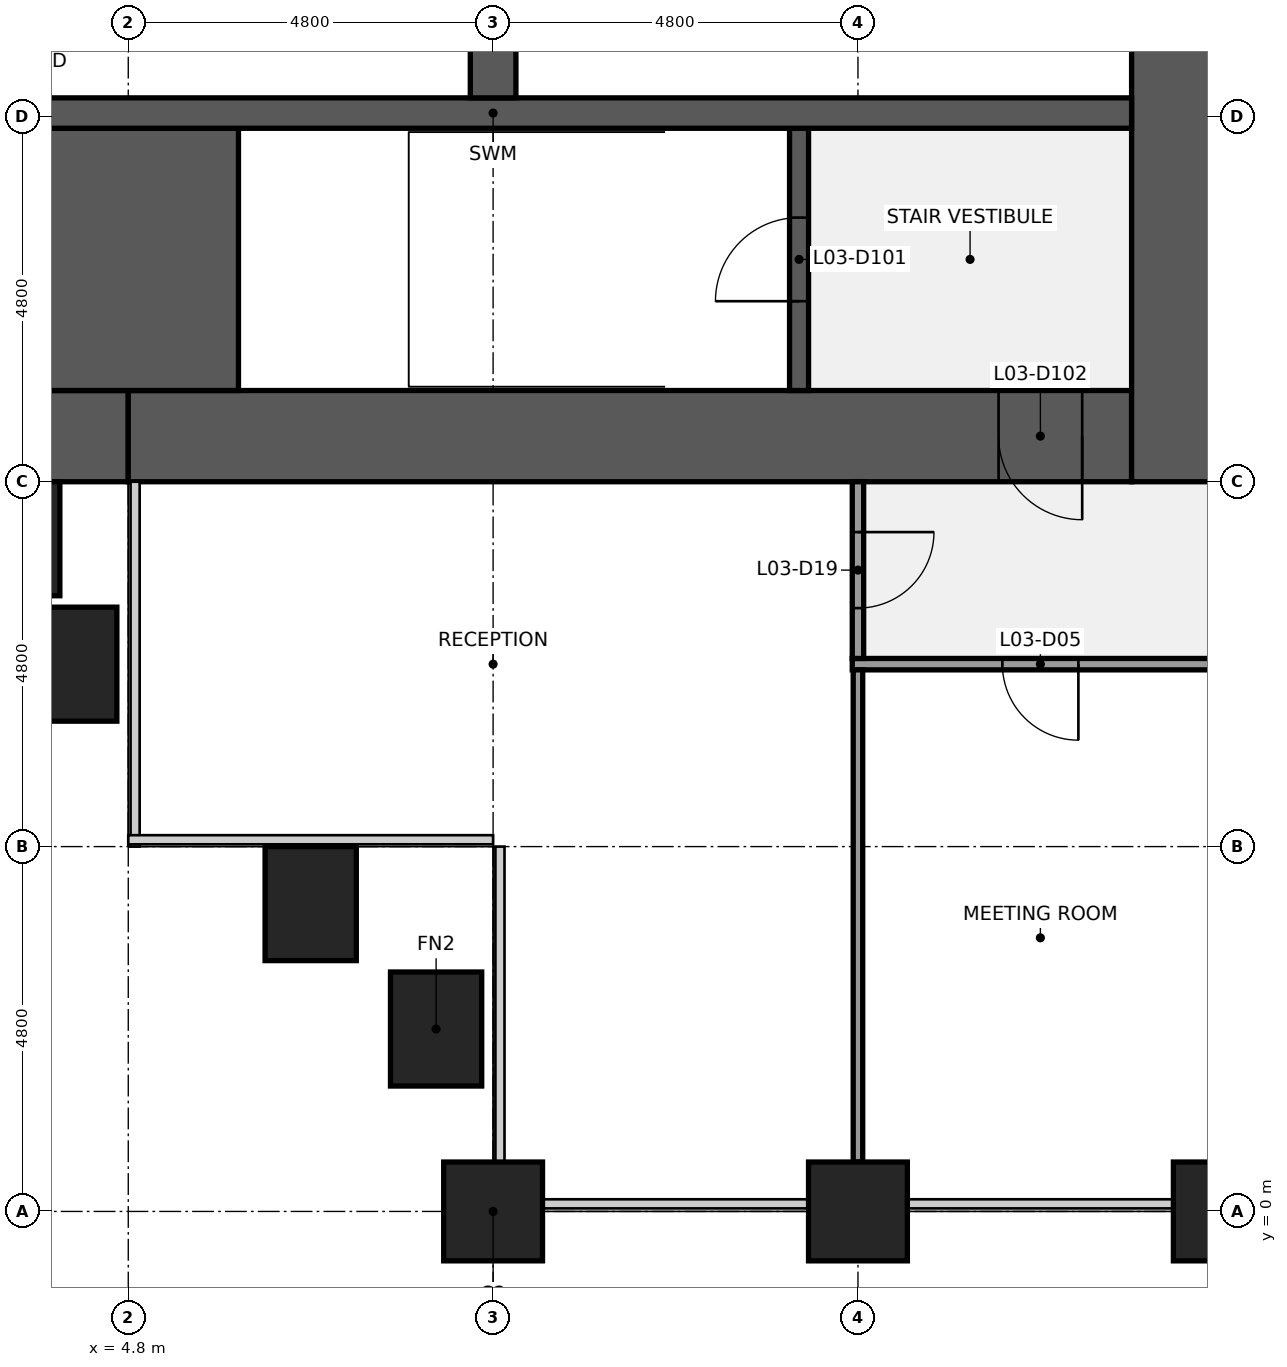
"""IFC4 building model, lengths in metres.
Left out: names, types, materials, properties, quantities, classifications, styles, units other than length and angle.
Written with IfcOpenShell. Run it as: python <this file> out.ifc"""

import sys

from ifc_helpers import new_model, si_unit, direction, frame, frame_2d, origin, origin_2d, place, context, subcontext, project, spatial, rectangle, extrude, element, fill, save


model = new_model("IFC4")
c1 = context("Model", 3, precision=1e-05, world=origin(), true_north=direction((0.0, 1.0)))
c2 = subcontext(c1, "Body", "Model", "MODEL_VIEW")
j1 = project(units=[si_unit("LENGTHUNIT", "METRE"), si_unit("PLANEANGLEUNIT", "RADIAN")], contexts=[c1])
p1 = place(None, origin())
s1 = spatial("IfcSite", under=j1, at=p1, CompositionType="ELEMENT")
p2 = place(p1, origin())
s2 = spatial("IfcBuilding", under=s1, at=p2, CompositionType="ELEMENT")
p3 = place(p2, frame((0.0, 0.0, 21.4)))
s3 = spatial("IfcBuildingStorey", under=s2, at=p3, CompositionType="ELEMENT", Elevation=21.4)
for number, where, z_axis, x_axis in (
    (1, (9.6, 0.0, 0.0), (0.0, 0.0, 1.0), (1.0, 0.0, 0.0)),
    (2, (14.4, 0.0, 0.0), (0.0, 0.0, 1.0), (1.0, 0.0, 0.0)),
    (3, (19.2, 0.0, 0.0), (0.0, 0.0, 1.0), (1.0, 0.0, 0.0)),
):
    element("IfcColumn", number, at=place(p3, frame(where, z_axis=z_axis, x_axis=x_axis)), inside=s3, PredefinedType="COLUMN", context=c2, shape_type="SweptSolid", body=[
        extrude(rectangle(XDim=1.3, YDim=1.3, at=origin_2d()), origin(), (0.0, 0.0, 1.0), 4.4),
    ])
p4 = place(p3, frame((4.8, 10.2, 0.0), z_axis=(0.0, 0.0, 1.0), x_axis=(-1.0, 0.0, 0.0)))
e4 = element("IfcWall", 4, at=p4, inside=s3, PredefinedType="SHEAR", context=c2, shape_type="SweptSolid", body=[
    extrude(rectangle(XDim=3.6, YDim=1.2, at=frame_2d((1.8, 0.0))), origin(), (0.0, 0.0, 1.0), 4.24),
])
p5 = place(p3, frame((18.0, 10.2, 0.0), z_axis=(0.0, 0.0, 1.0), x_axis=(-1.0, 0.0, 0.0)))
e5 = element("IfcWall", 5, at=p5, inside=s3, PredefinedType="SHEAR", context=c2, shape_type="SweptSolid", body=[
    extrude(rectangle(XDim=13.2, YDim=1.2, at=frame_2d((6.6, 0.0))), origin(), (0.0, 0.0, 1.0), 4.24),
])
p6 = place(p5, frame((0.65, 0.0, 0.0)))
e6 = element("IfcOpeningElement", 6, at=p6, cuts=e5, PredefinedType="OPENING", context=c2, shape_type="SweptSolid", body=[
    extrude(rectangle(XDim=1.1, YDim=2.1, at=frame_2d((0.55, 1.05))), frame((0.0, 0.61, 0.0), z_axis=(0.0, -1.0, 0.0), x_axis=(1.0, 0.0, 0.0)), (0.0, 0.0, 1.0), 1.22),
])
p7 = place(p3, frame((18.6, 38.4, 0.0), z_axis=(0.0, 0.0, 1.0), x_axis=(0.0, -1.0, 0.0)))
e7 = element("IfcWall", 7, at=p7, inside=s3, PredefinedType="SHEAR", context=c2, shape_type="SweptSolid", body=[
    extrude(rectangle(XDim=28.8, YDim=1.2, at=frame_2d((14.4, 0.0))), origin(), (0.0, 0.0, 1.0), 4.24),
])
p8 = place(p7, frame((18.3, 0.0, 0.0)))
e8 = element("IfcOpeningElement", 8, at=p8, cuts=e7, PredefinedType="OPENING", context=c2, shape_type="SweptSolid", body=[
    extrude(rectangle(XDim=1.8, YDim=2.1, at=frame_2d((0.9, 1.05))), frame((0.0, 0.61, 0.0), z_axis=(0.0, -1.0, 0.0), x_axis=(1.0, 0.0, 0.0)), (0.0, 0.0, 1.0), 1.22),
])
p9 = place(p7, frame((8.7, 0.0, 0.0)))
e9 = element("IfcOpeningElement", 9, at=p9, cuts=e7, PredefinedType="OPENING", context=c2, shape_type="SweptSolid", body=[
    extrude(rectangle(XDim=1.8, YDim=2.1, at=frame_2d((0.9, 1.05))), frame((0.0, 0.61, 0.0), z_axis=(0.0, -1.0, 0.0), x_axis=(1.0, 0.0, 0.0)), (0.0, 0.0, 1.0), 1.22),
])
p10 = place(p3, frame((1.2, 12.525, 0.0), z_axis=(0.0, 0.0, 1.0), x_axis=(1.0, 0.0, 0.0)))
e10 = element("IfcWall", 10, at=p10, inside=s3, PredefinedType="SHEAR", context=c2, shape_type="SweptSolid", body=[
    extrude(rectangle(XDim=5.05, YDim=3.45, at=frame_2d((2.525, 0.0))), origin(), (0.0, 0.0, 1.0), 4.24),
])
p11 = place(p3, frame((13.625, 10.8, 0.0), z_axis=(0.0, 0.0, 1.0), x_axis=(0.0, 1.0, 0.0)))
e11 = element("IfcWall", 11, at=p11, inside=s3, PredefinedType="SHEAR", context=c2, shape_type="SweptSolid", body=[
    extrude(rectangle(XDim=3.45, YDim=0.25, at=frame_2d((1.725, 0.0))), origin(), (0.0, 0.0, 1.0), 4.24),
])
p12 = place(p11, frame((1.175, 0.0, 0.0)))
e12 = element("IfcOpeningElement", 12, at=p12, cuts=e11, PredefinedType="OPENING", context=c2, shape_type="SweptSolid", body=[
    extrude(rectangle(XDim=1.1, YDim=2.1, at=frame_2d((0.55, 1.05))), frame((0.0, 0.135, 0.0), z_axis=(0.0, -1.0, 0.0), x_axis=(1.0, 0.0, 0.0)), (0.0, 0.0, 1.0), 0.27),
])
p13 = place(p3, frame((1.2, 14.45, 0.0), z_axis=(0.0, 0.0, 1.0), x_axis=(1.0, 0.0, 0.0)))
e13 = element("IfcWall", 13, at=p13, inside=s3, PredefinedType="SHEAR", context=c2, shape_type="SweptSolid", body=[
    extrude(rectangle(XDim=16.8, YDim=0.4, at=frame_2d((8.4, 0.0))), origin(), (0.0, 0.0, 1.0), 4.24),
])
p14 = place(p3, frame((9.6, 14.65, 0.0), z_axis=(0.0, 0.0, 1.0), x_axis=(0.0, 1.0, 0.0)))
e14 = element("IfcWall", 14, at=p14, inside=s3, PredefinedType="SHEAR", context=c2, shape_type="SweptSolid", body=[
    extrude(rectangle(XDim=2.6, YDim=0.6, at=frame_2d((1.3, 0.0))), origin(), (0.0, 0.0, 1.0), 4.24),
])
p15 = place(p3, frame((14.325, 7.2, 0.0), z_axis=(0.0, 0.0, 1.0), x_axis=(1.0, 0.0, 0.0)))
e15 = element("IfcWall", 15, at=p15, inside=s3, PredefinedType="PARTITIONING", context=c2, shape_type="SweptSolid", body=[
    extrude(rectangle(XDim=4.95, YDim=0.15, at=frame_2d((2.475, 0.0))), origin(), (0.0, 0.0, 1.0), 3.27),
])
p16 = place(p15, frame((1.975, 0.0, 0.0)))
e16 = element("IfcOpeningElement", 16, at=p16, cuts=e15, PredefinedType="OPENING", context=c2, shape_type="SweptSolid", body=[
    extrude(rectangle(XDim=1.0, YDim=2.1, at=frame_2d((0.5, 1.05))), frame((0.0, 0.085, 0.0), z_axis=(0.0, -1.0, 0.0), x_axis=(1.0, 0.0, 0.0)), (0.0, 0.0, 1.0), 0.17),
])
p17 = place(p3, frame((14.4, 0.65, 0.0), z_axis=(0.0, 0.0, 1.0), x_axis=(0.0, 1.0, 0.0)))
e17 = element("IfcWall", 17, at=p17, inside=s3, PredefinedType="PARTITIONING", context=c2, shape_type="SweptSolid", body=[
    extrude(rectangle(XDim=6.475, YDim=0.125, at=frame_2d((3.238, 0.0))), origin(), (0.0, 0.0, 1.0), 3.27),
])
p18 = place(p3, frame((14.4, 7.275, 0.0), z_axis=(0.0, 0.0, 1.0), x_axis=(0.0, 1.0, 0.0)))
e18 = element("IfcWall", 18, at=p18, inside=s3, PredefinedType="PARTITIONING", context=c2, shape_type="SweptSolid", body=[
    extrude(rectangle(XDim=2.325, YDim=0.15, at=frame_2d((1.163, 0.0))), origin(), (0.0, 0.0, 1.0), 3.27),
])
p19 = place(p18, frame((0.663, 0.0, 0.0)))
e19 = element("IfcOpeningElement", 19, at=p19, cuts=e18, PredefinedType="OPENING", context=c2, shape_type="SweptSolid", body=[
    extrude(rectangle(XDim=1.0, YDim=2.1, at=frame_2d((0.5, 1.05))), frame((0.0, 0.085, 0.0), z_axis=(0.0, -1.0, 0.0), x_axis=(1.0, 0.0, 0.0)), (0.0, 0.0, 1.0), 0.17),
])
for number, where, z_axis, x_axis in (
    (20, (4.05, 7.2, 0.0), (0.0, 0.0, 1.0), (0.0, 1.0, 0.0)),
    (21, (7.2, 4.05, 0.0), (0.0, 0.0, 1.0), (1.0, 0.0, 0.0)),
    (22, (8.85, 2.4, 0.0), (0.0, 0.0, 1.0), (0.0, 1.0, 0.0)),
):
    element("IfcColumn", number, at=place(p3, frame(where, z_axis=z_axis, x_axis=x_axis)), inside=s3, PredefinedType="PILASTER", context=c2, shape_type="SweptSolid", body=[
        extrude(rectangle(XDim=1.2, YDim=1.5, at=origin_2d()), origin(), (0.0, 0.0, 1.0), 4.4),
    ])
p20 = place(p3, frame((2.4, 8.85, 0.0), z_axis=(0.0, 0.0, 1.0), x_axis=(1.0, 0.0, 0.0)))
e23 = element("IfcColumn", 23, at=p20, inside=s3, PredefinedType="PILASTER", context=c2, shape_type="SweptSolid", body=[
    extrude(rectangle(XDim=3.0, YDim=1.5, at=origin_2d()), origin(), (0.0, 0.0, 1.0), 4.4),
])
for number, where, z_axis, x_axis in (
    (24, (9.6, -1.075, 0.0), (0.0, 0.0, 1.0), (1.0, 0.0, 0.0)),
    (25, (14.4, -1.075, 0.0), (0.0, 0.0, 1.0), (1.0, 0.0, 0.0)),
    (26, (19.2, -1.075, 0.0), (0.0, 0.0, 1.0), (1.0, 0.0, 0.0)),
):
    element("IfcColumn", number, at=place(p3, frame(where, z_axis=z_axis, x_axis=x_axis)), inside=s3, PredefinedType="PILASTER", context=c2, shape_type="SweptSolid", body=[
        extrude(rectangle(XDim=4.2, YDim=0.85, at=origin_2d()), origin(), (0.0, 0.0, 1.0), 4.4),
    ])
p21 = place(p12, origin())
e27 = element("IfcDoor", 27, at=p21, inside=s3, OperationType="SINGLE_SWING_LEFT", PredefinedType="DOOR", context=c2, shape_type="SweptSolid", body=[
    extrude(rectangle(XDim=1.1, YDim=2.1, at=frame_2d((0.55, 1.05))), frame((0.0, 0.025, 0.0), z_axis=(0.0, -1.0, 0.0), x_axis=(1.0, 0.0, 0.0)), (0.0, 0.0, 1.0), 0.05),
])
fill(e12, e27)
p22 = place(p6, origin())
e28 = element("IfcDoor", 28, at=p22, inside=s3, OperationType="SINGLE_SWING_LEFT", PredefinedType="DOOR", context=c2, shape_type="SweptSolid", body=[
    extrude(rectangle(XDim=1.1, YDim=2.1, at=frame_2d((0.55, 1.05))), frame((0.0, 0.025, 0.0), z_axis=(0.0, -1.0, 0.0), x_axis=(1.0, 0.0, 0.0)), (0.0, 0.0, 1.0), 0.05),
])
fill(e6, e28)
p23 = place(p16, origin())
e29 = element("IfcDoor", 29, at=p23, inside=s3, OperationType="SINGLE_SWING_RIGHT", PredefinedType="DOOR", context=c2, shape_type="SweptSolid", body=[
    extrude(rectangle(XDim=1.0, YDim=2.1, at=frame_2d((0.5, 1.05))), frame((0.0, 0.025, 0.0), z_axis=(0.0, -1.0, 0.0), x_axis=(1.0, 0.0, 0.0)), (0.0, 0.0, 1.0), 0.05),
])
fill(e16, e29)
p24 = place(p19, origin())
e30 = element("IfcDoor", 30, at=p24, inside=s3, OperationType="SINGLE_SWING_RIGHT", PredefinedType="DOOR", context=c2, shape_type="SweptSolid", body=[
    extrude(rectangle(XDim=1.0, YDim=2.1, at=frame_2d((0.5, 1.05))), frame((0.0, 0.025, 0.0), z_axis=(0.0, -1.0, 0.0), x_axis=(1.0, 0.0, 0.0)), (0.0, 0.0, 1.0), 0.05),
])
fill(e19, e30)
save(model, sys.argv[1])
